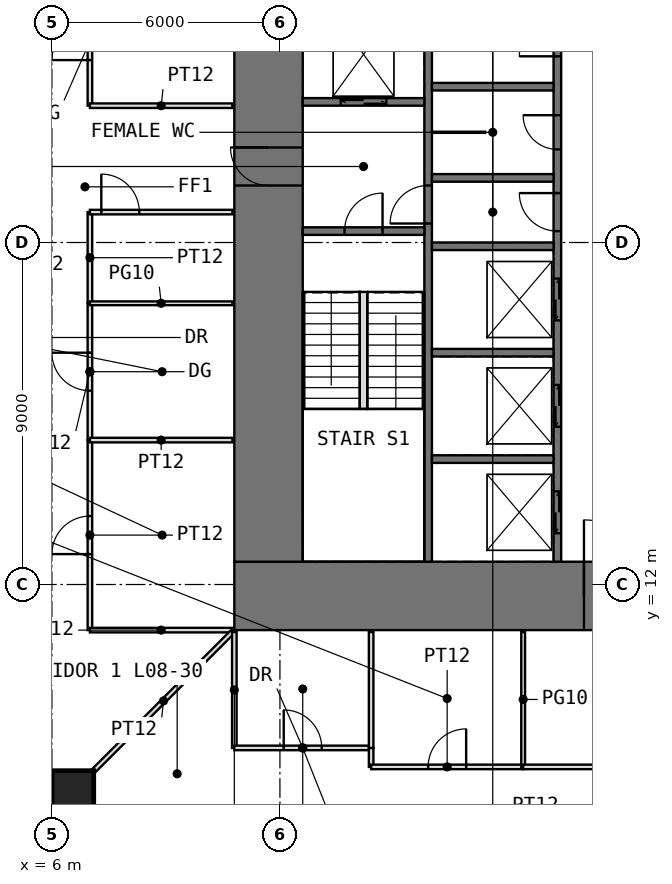
"""IFC4 building model, lengths in metres.
Left out: names, types, materials, properties, quantities, classifications, styles, units other than length and angle.
Written with IfcOpenShell. Run it as: python <this file> out.ifc"""

import sys

from ifc_helpers import new_model, si_unit, direction, frame, frame_2d, origin, origin_2d, place, context, subcontext, project, spatial, rectangle, extrude, element, fill, save


model = new_model("IFC4")
c1 = context("Model", 3, precision=1e-05, world=origin(), true_north=direction((0.0, 1.0)))
c2 = subcontext(c1, "Body", "Model", "MODEL_VIEW")
j1 = project(units=[si_unit("LENGTHUNIT", "METRE"), si_unit("PLANEANGLEUNIT", "RADIAN")], contexts=[c1])
p1 = place(None, origin())
s1 = spatial("IfcSite", under=j1, at=p1, CompositionType="ELEMENT")
p2 = place(p1, origin())
s2 = spatial("IfcBuilding", under=s1, at=p2, CompositionType="ELEMENT")
p3 = place(p2, frame((0.0, 0.0, 38.5)))
s3 = spatial("IfcBuildingStorey", under=s2, at=p3, CompositionType="ELEMENT", Elevation=38.5)
p4 = place(p3, frame((6.55, 6.55, 0.0), z_axis=(0.0, 0.0, 1.0), x_axis=(1.0, 0.0, 0.0)))
e1 = element("IfcColumn", 1, at=p4, inside=s3, PredefinedType="COLUMN", context=c2, shape_type="SweptSolid", body=[
    extrude(rectangle(XDim=1.1, YDim=1.1, at=origin_2d()), origin(), (0.0, 0.0, 1.0), 4.0),
])
p5 = place(p3, frame((10.8, 11.7, -0.05), z_axis=(0.0, 0.0, 1.0), x_axis=(1.0, 0.0, 0.0)))
e2 = element("IfcWall", 2, at=p5, inside=s3, PredefinedType="SHEAR", context=c2, shape_type="SweptSolid", body=[
    extrude(rectangle(XDim=20.4, YDim=1.8, at=frame_2d((10.2, 0.0))), origin(), (0.0, 0.0, 1.0), 4.0),
])
p6 = place(p5, frame((9.2, 0.0, 0.05)))
e3 = element("IfcOpeningElement", 3, at=p6, cuts=e2, PredefinedType="OPENING", context=c2, shape_type="SweptSolid", body=[
    extrude(rectangle(XDim=2.0, YDim=2.2, at=frame_2d((1.0, 1.1))), frame((0.0, 0.91, 0.0), z_axis=(0.0, -1.0, 0.0), x_axis=(1.0, 0.0, 0.0)), (0.0, 0.0, 1.0), 1.82),
])
p7 = place(p3, frame((11.7, 12.6, -0.05), z_axis=(0.0, 0.0, 1.0), x_axis=(0.0, 1.0, 0.0)))
e4 = element("IfcWall", 4, at=p7, inside=s3, PredefinedType="SHEAR", context=c2, shape_type="SweptSolid", body=[
    extrude(rectangle(XDim=16.8, YDim=1.8, at=frame_2d((8.4, 0.0))), origin(), (0.0, 0.0, 1.0), 4.0),
])
p8 = place(p7, frame((9.9, 0.0, 0.05)))
e5 = element("IfcOpeningElement", 5, at=p8, cuts=e4, PredefinedType="OPENING", context=c2, shape_type="SweptSolid", body=[
    extrude(rectangle(XDim=1.0, YDim=2.2, at=frame_2d((0.5, 1.1))), frame((0.0, 0.91, 0.0), z_axis=(0.0, -1.0, 0.0), x_axis=(1.0, 0.0, 0.0)), (0.0, 0.0, 1.0), 1.82),
])
p9 = place(p3, frame((15.9, 12.6, -0.05), z_axis=(0.0, 0.0, 1.0), x_axis=(0.0, 1.0, 0.0)))
e6 = element("IfcWall", 6, at=p9, inside=s3, PredefinedType="SHEAR", context=c2, shape_type="SweptSolid", body=[
    extrude(rectangle(XDim=16.8, YDim=0.2, at=frame_2d((8.4, 0.0))), origin(), (0.0, 0.0, 1.0), 4.0),
])
p10 = place(p9, frame((8.9, 0.0, 0.05)))
e7 = element("IfcOpeningElement", 7, at=p10, cuts=e6, PredefinedType="OPENING", context=c2, shape_type="SweptSolid", body=[
    extrude(rectangle(XDim=1.0, YDim=2.2, at=frame_2d((0.5, 1.1))), frame((0.0, 0.11, 0.0), z_axis=(0.0, -1.0, 0.0), x_axis=(1.0, 0.0, 0.0)), (0.0, 0.0, 1.0), 0.22),
])
p11 = place(p3, frame((19.3, 12.6, -0.05), z_axis=(0.0, 0.0, 1.0), x_axis=(0.0, 1.0, 0.0)))
e8 = element("IfcWall", 8, at=p11, inside=s3, PredefinedType="SHEAR", context=c2, shape_type="SweptSolid", body=[
    extrude(rectangle(XDim=16.8, YDim=0.2, at=frame_2d((8.4, 0.0))), origin(), (0.0, 0.0, 1.0), 4.0),
])
p12 = place(p11, frame((8.7, 0.0, 0.05)))
e9 = element("IfcOpeningElement", 9, at=p12, cuts=e8, PredefinedType="OPENING", context=c2, shape_type="SweptSolid", body=[
    extrude(rectangle(XDim=1.0, YDim=2.2, at=frame_2d((0.5, 1.1))), frame((0.0, 0.11, 0.0), z_axis=(0.0, -1.0, 0.0), x_axis=(1.0, 0.0, 0.0)), (0.0, 0.0, 1.0), 0.22),
])
p13 = place(p11, frame((10.85, 0.0, 0.05)))
e10 = element("IfcOpeningElement", 10, at=p13, cuts=e8, PredefinedType="OPENING", context=c2, shape_type="SweptSolid", body=[
    extrude(rectangle(XDim=0.9, YDim=2.2, at=frame_2d((0.45, 1.1))), frame((0.0, 0.11, 0.0), z_axis=(0.0, -1.0, 0.0), x_axis=(1.0, 0.0, 0.0)), (0.0, 0.0, 1.0), 0.22),
])
p14 = place(p11, frame((13.3, 0.0, 0.05)))
e11 = element("IfcOpeningElement", 11, at=p14, cuts=e8, PredefinedType="OPENING", context=c2, shape_type="SweptSolid", body=[
    extrude(rectangle(XDim=1.0, YDim=2.2, at=frame_2d((0.5, 1.1))), frame((0.0, 0.11, 0.0), z_axis=(0.0, -1.0, 0.0), x_axis=(1.0, 0.0, 0.0)), (0.0, 0.0, 1.0), 0.22),
])
p15 = place(p11, frame((15.55, 0.0, 0.05)))
e12 = element("IfcOpeningElement", 12, at=p15, cuts=e8, PredefinedType="OPENING", context=c2, shape_type="SweptSolid", body=[
    extrude(rectangle(XDim=0.9, YDim=2.2, at=frame_2d((0.45, 1.1))), frame((0.0, 0.11, 0.0), z_axis=(0.0, -1.0, 0.0), x_axis=(1.0, 0.0, 0.0)), (0.0, 0.0, 1.0), 0.22),
])
p16 = place(p11, frame((0.75, 0.0, 0.05)))
e13 = element("IfcOpeningElement", 13, at=p16, cuts=e8, PredefinedType="OPENING", context=c2, shape_type="SweptSolid", body=[
    extrude(rectangle(XDim=1.1, YDim=2.2, at=frame_2d((0.55, 1.1))), frame((0.0, 0.11, 0.0), z_axis=(0.0, -1.0, 0.0), x_axis=(1.0, 0.0, 0.0)), (0.0, 0.0, 1.0), 0.22),
])
p17 = place(p11, frame((3.55, 0.0, 0.05)))
e14 = element("IfcOpeningElement", 14, at=p17, cuts=e8, PredefinedType="OPENING", context=c2, shape_type="SweptSolid", body=[
    extrude(rectangle(XDim=1.1, YDim=2.2, at=frame_2d((0.55, 1.1))), frame((0.0, 0.11, 0.0), z_axis=(0.0, -1.0, 0.0), x_axis=(1.0, 0.0, 0.0)), (0.0, 0.0, 1.0), 0.22),
])
p18 = place(p11, frame((6.35, 0.0, 0.05)))
e15 = element("IfcOpeningElement", 15, at=p18, cuts=e8, PredefinedType="OPENING", context=c2, shape_type="SweptSolid", body=[
    extrude(rectangle(XDim=1.1, YDim=2.2, at=frame_2d((0.55, 1.1))), frame((0.0, 0.11, 0.0), z_axis=(0.0, -1.0, 0.0), x_axis=(1.0, 0.0, 0.0)), (0.0, 0.0, 1.0), 0.22),
])
p19 = place(p3, frame((12.6, 21.3, -0.05), z_axis=(0.0, 0.0, 1.0), x_axis=(1.0, 0.0, 0.0)))
e16 = element("IfcWall", 16, at=p19, inside=s3, PredefinedType="SHEAR", context=c2, shape_type="SweptSolid", body=[
    extrude(rectangle(XDim=3.2, YDim=0.2, at=frame_2d((1.6, 0.0))), origin(), (0.0, 0.0, 1.0), 4.0),
])
p20 = place(p19, frame((1.1, 0.0, 0.05)))
e17 = element("IfcOpeningElement", 17, at=p20, cuts=e16, PredefinedType="OPENING", context=c2, shape_type="SweptSolid", body=[
    extrude(rectangle(XDim=1.0, YDim=2.2, at=frame_2d((0.5, 1.1))), frame((0.0, 0.11, 0.0), z_axis=(0.0, -1.0, 0.0), x_axis=(1.0, 0.0, 0.0)), (0.0, 0.0, 1.0), 0.22),
])
p21 = place(p3, frame((12.6, 24.7, -0.05), z_axis=(0.0, 0.0, 1.0), x_axis=(1.0, 0.0, 0.0)))
e18 = element("IfcWall", 18, at=p21, inside=s3, PredefinedType="SHEAR", context=c2, shape_type="SweptSolid", body=[
    extrude(rectangle(XDim=3.2, YDim=0.2, at=frame_2d((1.6, 0.0))), origin(), (0.0, 0.0, 1.0), 4.0),
])
p22 = place(p21, frame((1.0, 0.0, 0.05)))
e19 = element("IfcOpeningElement", 19, at=p22, cuts=e18, PredefinedType="OPENING", context=c2, shape_type="SweptSolid", body=[
    extrude(rectangle(XDim=1.2, YDim=2.2, at=frame_2d((0.6, 1.1))), frame((0.0, 0.11, 0.0), z_axis=(0.0, -1.0, 0.0), x_axis=(1.0, 0.0, 0.0)), (0.0, 0.0, 1.0), 0.22),
])
for number, where, z_axis, x_axis in (
    (20, (16.0, 15.3, -0.05), (0.0, 0.0, 1.0), (1.0, 0.0, 0.0)),
    (21, (16.0, 18.1, -0.05), (0.0, 0.0, 1.0), (1.0, 0.0, 0.0)),
    (22, (16.0, 20.9, -0.05), (0.0, 0.0, 1.0), (1.0, 0.0, 0.0)),
    (23, (16.0, 22.7, -0.05), (0.0, 0.0, 1.0), (1.0, 0.0, 0.0)),
    (24, (16.0, 25.1, -0.05), (0.0, 0.0, 1.0), (1.0, 0.0, 0.0)),
):
    element("IfcWall", number, at=place(p3, frame(where, z_axis=z_axis, x_axis=x_axis)), inside=s3, PredefinedType="SHEAR", context=c2, shape_type="SweptSolid", body=[
        extrude(rectangle(XDim=3.2, YDim=0.2, at=frame_2d((1.6, 0.0))), origin(), (0.0, 0.0, 1.0), 4.0),
    ])
p23 = place(p3, frame((16.0, 23.9, 0.0), z_axis=(0.0, 0.0, 1.0), x_axis=(1.0, 0.0, 0.0)))
e25 = element("IfcWall", 25, at=p23, inside=s3, PredefinedType="PARTITIONING", context=c2, shape_type="SweptSolid", body=[
    extrude(rectangle(XDim=1.4, YDim=0.03, at=frame_2d((0.7, 0.0))), origin(), (0.0, 0.0, 1.0), 3.75),
])
p24 = place(p3, frame((7.0, 10.8, 0.0), z_axis=(0.0, 0.0, 1.0), x_axis=(0.0, 1.0, 0.0)))
e26 = element("IfcWall", 26, at=p24, inside=s3, PredefinedType="PARTITIONING", context=c2, shape_type="SweptSolid", body=[
    extrude(rectangle(XDim=5.0, YDim=0.12, at=frame_2d((2.5, 0.0))), origin(), (0.0, 0.0, 1.0), 3.75),
])
p25 = place(p24, frame((2.0, 0.0, 0.0)))
e27 = element("IfcOpeningElement", 27, at=p25, cuts=e26, PredefinedType="OPENING", context=c2, shape_type="SweptSolid", body=[
    extrude(rectangle(XDim=1.0, YDim=2.2, at=frame_2d((0.5, 1.1))), frame((0.0, 0.07, 0.0), z_axis=(0.0, -1.0, 0.0), x_axis=(1.0, 0.0, 0.0)), (0.0, 0.0, 1.0), 0.14),
])
p26 = place(p3, frame((7.0, 10.8, 0.0), z_axis=(0.0, 0.0, 1.0), x_axis=(1.0, 0.0, 0.0)))
e28 = element("IfcWall", 28, at=p26, inside=s3, PredefinedType="PARTITIONING", context=c2, shape_type="SweptSolid", body=[
    extrude(rectangle(XDim=3.75, YDim=0.12, at=frame_2d((1.875, 0.0))), origin(), (0.0, 0.0, 1.0), 3.75),
])
p27 = place(p3, frame((7.0, 15.8, 0.0), z_axis=(0.0, 0.0, 1.0), x_axis=(0.0, 1.0, 0.0)))
e29 = element("IfcWall", 29, at=p27, inside=s3, PredefinedType="PARTITIONING", context=c2, shape_type="SweptSolid", body=[
    extrude(rectangle(XDim=3.6, YDim=0.12, at=frame_2d((1.8, 0.0))), origin(), (0.0, 0.0, 1.0), 3.75),
])
p28 = place(p27, frame((1.3, 0.0, 0.0)))
e30 = element("IfcOpeningElement", 30, at=p28, cuts=e29, PredefinedType="OPENING", context=c2, shape_type="SweptSolid", body=[
    extrude(rectangle(XDim=1.0, YDim=2.4, at=frame_2d((0.5, 1.2))), frame((0.0, 0.07, 0.0), z_axis=(0.0, -1.0, 0.0), x_axis=(1.0, 0.0, 0.0)), (0.0, 0.0, 1.0), 0.14),
])
p29 = place(p3, frame((7.0, 15.8, 0.0), z_axis=(0.0, 0.0, 1.0), x_axis=(1.0, 0.0, 0.0)))
e31 = element("IfcWall", 31, at=p29, inside=s3, PredefinedType="PARTITIONING", context=c2, shape_type="SweptSolid", body=[
    extrude(rectangle(XDim=3.75, YDim=0.12, at=frame_2d((1.875, 0.0))), origin(), (0.0, 0.0, 1.0), 3.75),
])
p30 = place(p3, frame((7.0, 19.4, 0.0), z_axis=(0.0, 0.0, 1.0), x_axis=(0.0, 1.0, 0.0)))
e32 = element("IfcWall", 32, at=p30, inside=s3, PredefinedType="PARTITIONING", context=c2, shape_type="SweptSolid", body=[
    extrude(rectangle(XDim=2.4, YDim=0.12, at=frame_2d((1.2, 0.0))), origin(), (0.0, 0.0, 1.0), 3.75),
])
p31 = place(p3, frame((7.0, 19.4, 0.0), z_axis=(0.0, 0.0, 1.0), x_axis=(1.0, 0.0, 0.0)))
e33 = element("IfcWall", 33, at=p31, inside=s3, PredefinedType="PARTITIONING", context=c2, shape_type="SweptSolid", body=[
    extrude(rectangle(XDim=3.75, YDim=0.1, at=frame_2d((1.875, 0.0))), origin(), (0.0, 0.0, 1.0), 3.75),
])
p32 = place(p3, frame((7.0, 21.8, 0.0), z_axis=(0.0, 0.0, 1.0), x_axis=(1.0, 0.0, 0.0)))
e34 = element("IfcWall", 34, at=p32, inside=s3, PredefinedType="PARTITIONING", context=c2, shape_type="SweptSolid", body=[
    extrude(rectangle(XDim=3.75, YDim=0.12, at=frame_2d((1.875, 0.0))), origin(), (0.0, 0.0, 1.0), 3.75),
])
p33 = place(p32, frame((0.3, 0.0, 0.0)))
e35 = element("IfcOpeningElement", 35, at=p33, cuts=e34, PredefinedType="OPENING", context=c2, shape_type="SweptSolid", body=[
    extrude(rectangle(XDim=1.0, YDim=2.4, at=frame_2d((0.5, 1.2))), frame((0.0, 0.07, 0.0), z_axis=(0.0, -1.0, 0.0), x_axis=(1.0, 0.0, 0.0)), (0.0, 0.0, 1.0), 0.14),
])
p34 = place(p3, frame((7.0, 24.6, 0.0), z_axis=(0.0, 0.0, 1.0), x_axis=(0.0, 1.0, 0.0)))
e36 = element("IfcWall", 36, at=p34, inside=s3, PredefinedType="PARTITIONING", context=c2, shape_type="SweptSolid", body=[
    extrude(rectangle(XDim=3.4, YDim=0.12, at=frame_2d((1.7, 0.0))), origin(), (0.0, 0.0, 1.0), 3.75),
])
p35 = place(p34, frame((1.2, 0.0, 0.0)))
e37 = element("IfcOpeningElement", 37, at=p35, cuts=e36, PredefinedType="OPENING", context=c2, shape_type="SweptSolid", body=[
    extrude(rectangle(XDim=1.0, YDim=2.4, at=frame_2d((0.5, 1.2))), frame((0.0, 0.07, 0.0), z_axis=(0.0, -1.0, 0.0), x_axis=(1.0, 0.0, 0.0)), (0.0, 0.0, 1.0), 0.14),
])
p36 = place(p3, frame((7.0, 24.6, 0.0), z_axis=(0.0, 0.0, 1.0), x_axis=(1.0, 0.0, 0.0)))
e38 = element("IfcWall", 38, at=p36, inside=s3, PredefinedType="PARTITIONING", context=c2, shape_type="SweptSolid", body=[
    extrude(rectangle(XDim=3.75, YDim=0.12, at=frame_2d((1.875, 0.0))), origin(), (0.0, 0.0, 1.0), 3.75),
])
p37 = place(p3, frame((7.11, 7.11, 0.0), z_axis=(0.0, 0.0, 1.0), x_axis=(0.707106781187, 0.707106781187, 0.0)))
e39 = element("IfcWall", 39, at=p37, inside=s3, PredefinedType="PARTITIONING", context=c2, shape_type="SweptSolid", body=[
    extrude(rectangle(XDim=5.168, YDim=0.12, at=frame_2d((2.584, 0.0))), origin(), (0.0, 0.0, 1.0), 3.75),
])
p38 = place(p3, frame((10.8, 7.7, 0.0), z_axis=(0.0, 0.0, 1.0), x_axis=(0.0, 1.0, 0.0)))
e40 = element("IfcWall", 40, at=p38, inside=s3, PredefinedType="PARTITIONING", context=c2, shape_type="SweptSolid", body=[
    extrude(rectangle(XDim=3.05, YDim=0.12, at=frame_2d((1.525, 0.0))), origin(), (0.0, 0.0, 1.0), 3.75),
])
p39 = place(p3, frame((10.8, 7.7, 0.0), z_axis=(0.0, 0.0, 1.0), x_axis=(1.0, 0.0, 0.0)))
e41 = element("IfcWall", 41, at=p39, inside=s3, PredefinedType="PARTITIONING", context=c2, shape_type="SweptSolid", body=[
    extrude(rectangle(XDim=3.6, YDim=0.12, at=frame_2d((1.8, 0.0))), origin(), (0.0, 0.0, 1.0), 3.75),
])
p40 = place(p39, frame((1.3, 0.0, 0.0)))
e42 = element("IfcOpeningElement", 42, at=p40, cuts=e41, PredefinedType="OPENING", context=c2, shape_type="SweptSolid", body=[
    extrude(rectangle(XDim=1.0, YDim=2.2, at=frame_2d((0.5, 1.1))), frame((0.0, 0.07, 0.0), z_axis=(0.0, -1.0, 0.0), x_axis=(1.0, 0.0, 0.0)), (0.0, 0.0, 1.0), 0.14),
])
p41 = place(p3, frame((14.4, 7.2, 0.0), z_axis=(0.0, 0.0, 1.0), x_axis=(0.0, 1.0, 0.0)))
e43 = element("IfcWall", 43, at=p41, inside=s3, PredefinedType="PARTITIONING", context=c2, shape_type="SweptSolid", body=[
    extrude(rectangle(XDim=0.5, YDim=0.12, at=frame_2d((0.25, 0.0))), origin(), (0.0, 0.0, 1.0), 3.75),
])
p42 = place(p3, frame((14.4, 7.2, 0.0), z_axis=(0.0, 0.0, 1.0), x_axis=(1.0, 0.0, 0.0)))
e44 = element("IfcWall", 44, at=p42, inside=s3, PredefinedType="PARTITIONING", context=c2, shape_type="SweptSolid", body=[
    extrude(rectangle(XDim=4.0, YDim=0.12, at=frame_2d((2.0, 0.0))), origin(), (0.0, 0.0, 1.0), 3.75),
])
p43 = place(p42, frame((1.5, 0.0, 0.0)))
e45 = element("IfcOpeningElement", 45, at=p43, cuts=e44, PredefinedType="OPENING", context=c2, shape_type="SweptSolid", body=[
    extrude(rectangle(XDim=1.0, YDim=2.4, at=frame_2d((0.5, 1.2))), frame((0.0, 0.07, 0.0), z_axis=(0.0, -1.0, 0.0), x_axis=(1.0, 0.0, 0.0)), (0.0, 0.0, 1.0), 0.14),
])
p44 = place(p3, frame((14.4, 7.7, 0.0), z_axis=(0.0, 0.0, 1.0), x_axis=(0.0, 1.0, 0.0)))
e46 = element("IfcWall", 46, at=p44, inside=s3, PredefinedType="PARTITIONING", context=c2, shape_type="SweptSolid", body=[
    extrude(rectangle(XDim=3.05, YDim=0.12, at=frame_2d((1.525, 0.0))), origin(), (0.0, 0.0, 1.0), 3.75),
])
p45 = place(p3, frame((18.4, 7.2, 0.0), z_axis=(0.0, 0.0, 1.0), x_axis=(0.0, 1.0, 0.0)))
e47 = element("IfcWall", 47, at=p45, inside=s3, PredefinedType="PARTITIONING", context=c2, shape_type="SweptSolid", body=[
    extrude(rectangle(XDim=3.55, YDim=0.1, at=frame_2d((1.775, 0.0))), origin(), (0.0, 0.0, 1.0), 3.75),
])
p46 = place(p3, frame((18.4, 7.2, 0.0), z_axis=(0.0, 0.0, 1.0), x_axis=(1.0, 0.0, 0.0)))
e48 = element("IfcWall", 48, at=p46, inside=s3, PredefinedType="PARTITIONING", context=c2, shape_type="SweptSolid", body=[
    extrude(rectangle(XDim=5.2, YDim=0.12, at=frame_2d((2.6, 0.0))), origin(), (0.0, 0.0, 1.0), 3.75),
])
p47 = place(p46, frame((2.1, 0.0, 0.0)))
e49 = element("IfcOpeningElement", 49, at=p47, cuts=e48, PredefinedType="OPENING", context=c2, shape_type="SweptSolid", body=[
    extrude(rectangle(XDim=1.0, YDim=2.4, at=frame_2d((0.5, 1.2))), frame((0.0, 0.07, 0.0), z_axis=(0.0, -1.0, 0.0), x_axis=(1.0, 0.0, 0.0)), (0.0, 0.0, 1.0), 0.14),
])
p48 = place(p3, frame((14.2, 16.62, 0.0), z_axis=(0.0, 0.0, 1.0), x_axis=(0.0, 1.0, 0.0)))
e50 = element("IfcWall", 50, at=p48, inside=s3, PredefinedType="PARTITIONING", context=c2, shape_type="SweptSolid", body=[
    extrude(rectangle(XDim=3.08, YDim=0.2, at=frame_2d((1.54, 0.0))), origin(), (0.0, 0.0, 1.0), 4.0),
])
p49 = place(p6, origin())
e51 = element("IfcDoor", 51, at=p49, inside=s3, OperationType="DOUBLE_DOOR_SINGLE_SWING", PredefinedType="DOOR", context=c2, shape_type="SweptSolid", body=[
    extrude(rectangle(XDim=2.0, YDim=2.2, at=frame_2d((1.0, 1.1))), frame((0.0, 0.025, 0.0), z_axis=(0.0, -1.0, 0.0), x_axis=(1.0, 0.0, 0.0)), (0.0, 0.0, 1.0), 0.05),
])
fill(e3, e51)
p50 = place(p8, origin())
e52 = element("IfcDoor", 52, at=p50, inside=s3, OperationType="SINGLE_SWING_RIGHT", PredefinedType="DOOR", context=c2, shape_type="SweptSolid", body=[
    extrude(rectangle(XDim=1.0, YDim=2.2, at=frame_2d((0.5, 1.1))), frame((0.0, 0.025, 0.0), z_axis=(0.0, -1.0, 0.0), x_axis=(1.0, 0.0, 0.0)), (0.0, 0.0, 1.0), 0.05),
])
fill(e5, e52)
p51 = place(p20, origin())
e53 = element("IfcDoor", 53, at=p51, inside=s3, OperationType="SINGLE_SWING_RIGHT", PredefinedType="DOOR", context=c2, shape_type="SweptSolid", body=[
    extrude(rectangle(XDim=1.0, YDim=2.2, at=frame_2d((0.5, 1.1))), frame((0.0, 0.025, 0.0), z_axis=(0.0, -1.0, 0.0), x_axis=(1.0, 0.0, 0.0)), (0.0, 0.0, 1.0), 0.05),
])
fill(e17, e53)
p52 = place(p10, origin())
e54 = element("IfcDoor", 54, at=p52, inside=s3, OperationType="SINGLE_SWING_LEFT", PredefinedType="DOOR", context=c2, shape_type="SweptSolid", body=[
    extrude(rectangle(XDim=1.0, YDim=2.2, at=frame_2d((0.5, 1.1))), frame((0.0, 0.025, 0.0), z_axis=(0.0, -1.0, 0.0), x_axis=(1.0, 0.0, 0.0)), (0.0, 0.0, 1.0), 0.05),
])
fill(e7, e54)
p53 = place(p12, origin())
e55 = element("IfcDoor", 55, at=p53, inside=s3, OperationType="SINGLE_SWING_RIGHT", PredefinedType="DOOR", context=c2, shape_type="SweptSolid", body=[
    extrude(rectangle(XDim=1.0, YDim=2.2, at=frame_2d((0.5, 1.1))), frame((0.0, 0.025, 0.0), z_axis=(0.0, -1.0, 0.0), x_axis=(1.0, 0.0, 0.0)), (0.0, 0.0, 1.0), 0.05),
])
fill(e9, e55)
p54 = place(p13, origin())
e56 = element("IfcDoor", 56, at=p54, inside=s3, OperationType="SINGLE_SWING_RIGHT", PredefinedType="DOOR", context=c2, shape_type="SweptSolid", body=[
    extrude(rectangle(XDim=0.9, YDim=2.2, at=frame_2d((0.45, 1.1))), frame((0.0, 0.025, 0.0), z_axis=(0.0, -1.0, 0.0), x_axis=(1.0, 0.0, 0.0)), (0.0, 0.0, 1.0), 0.05),
])
fill(e10, e56)
p55 = place(p14, origin())
e57 = element("IfcDoor", 57, at=p55, inside=s3, OperationType="SINGLE_SWING_LEFT", PredefinedType="DOOR", context=c2, shape_type="SweptSolid", body=[
    extrude(rectangle(XDim=1.0, YDim=2.2, at=frame_2d((0.5, 1.1))), frame((0.0, 0.025, 0.0), z_axis=(0.0, -1.0, 0.0), x_axis=(1.0, 0.0, 0.0)), (0.0, 0.0, 1.0), 0.05),
])
fill(e11, e57)
p56 = place(p40, origin())
e58 = element("IfcDoor", 58, at=p56, inside=s3, OperationType="SINGLE_SWING_LEFT", PredefinedType="DOOR", context=c2, shape_type="SweptSolid", body=[
    extrude(rectangle(XDim=1.0, YDim=2.2, at=frame_2d((0.5, 1.1))), frame((0.0, 0.025, 0.0), z_axis=(0.0, -1.0, 0.0), x_axis=(1.0, 0.0, 0.0)), (0.0, 0.0, 1.0), 0.05),
])
fill(e42, e58)
p57 = place(p43, origin())
e59 = element("IfcDoor", 59, at=p57, inside=s3, OperationType="SINGLE_SWING_RIGHT", PredefinedType="DOOR", context=c2, shape_type="SweptSolid", body=[
    extrude(rectangle(XDim=1.0, YDim=2.4, at=frame_2d((0.5, 1.2))), frame((0.0, 0.025, 0.0), z_axis=(0.0, -1.0, 0.0), x_axis=(1.0, 0.0, 0.0)), (0.0, 0.0, 1.0), 0.05),
])
fill(e45, e59)
p58 = place(p25, origin())
e60 = element("IfcDoor", 60, at=p58, inside=s3, OperationType="SINGLE_SWING_LEFT", PredefinedType="DOOR", context=c2, shape_type="SweptSolid", body=[
    extrude(rectangle(XDim=1.0, YDim=2.2, at=frame_2d((0.5, 1.1))), frame((0.0, 0.025, 0.0), z_axis=(0.0, -1.0, 0.0), x_axis=(1.0, 0.0, 0.0)), (0.0, 0.0, 1.0), 0.05),
])
fill(e27, e60)
p59 = place(p28, origin())
e61 = element("IfcDoor", 61, at=p59, inside=s3, OperationType="SINGLE_SWING_RIGHT", PredefinedType="DOOR", context=c2, shape_type="SweptSolid", body=[
    extrude(rectangle(XDim=1.0, YDim=2.4, at=frame_2d((0.5, 1.2))), frame((0.0, 0.025, 0.0), z_axis=(0.0, -1.0, 0.0), x_axis=(1.0, 0.0, 0.0)), (0.0, 0.0, 1.0), 0.05),
])
fill(e30, e61)
p60 = place(p35, origin())
e62 = element("IfcDoor", 62, at=p60, inside=s3, OperationType="SINGLE_SWING_LEFT", PredefinedType="DOOR", context=c2, shape_type="SweptSolid", body=[
    extrude(rectangle(XDim=1.0, YDim=2.4, at=frame_2d((0.5, 1.2))), frame((0.0, 0.025, 0.0), z_axis=(0.0, -1.0, 0.0), x_axis=(1.0, 0.0, 0.0)), (0.0, 0.0, 1.0), 0.05),
])
fill(e37, e62)
p61 = place(p33, origin())
e63 = element("IfcDoor", 63, at=p61, inside=s3, OperationType="SINGLE_SWING_LEFT", PredefinedType="DOOR", context=c2, shape_type="SweptSolid", body=[
    extrude(rectangle(XDim=1.0, YDim=2.4, at=frame_2d((0.5, 1.2))), frame((0.0, 0.025, 0.0), z_axis=(0.0, -1.0, 0.0), x_axis=(1.0, 0.0, 0.0)), (0.0, 0.0, 1.0), 0.05),
])
fill(e35, e63)
p62 = place(p16, origin())
e64 = element("IfcDoor", 64, at=p62, inside=s3, OperationType="DOUBLE_DOOR_SLIDING", PredefinedType="DOOR", context=c2, shape_type="SweptSolid", body=[
    extrude(rectangle(XDim=1.1, YDim=2.2, at=frame_2d((0.55, 1.1))), frame((0.0, 0.025, 0.0), z_axis=(0.0, -1.0, 0.0), x_axis=(1.0, 0.0, 0.0)), (0.0, 0.0, 1.0), 0.05),
])
fill(e13, e64)
p63 = place(p17, origin())
e65 = element("IfcDoor", 65, at=p63, inside=s3, OperationType="DOUBLE_DOOR_SLIDING", PredefinedType="DOOR", context=c2, shape_type="SweptSolid", body=[
    extrude(rectangle(XDim=1.1, YDim=2.2, at=frame_2d((0.55, 1.1))), frame((0.0, 0.025, 0.0), z_axis=(0.0, -1.0, 0.0), x_axis=(1.0, 0.0, 0.0)), (0.0, 0.0, 1.0), 0.05),
])
fill(e14, e65)
p64 = place(p18, origin())
e66 = element("IfcDoor", 66, at=p64, inside=s3, OperationType="DOUBLE_DOOR_SLIDING", PredefinedType="DOOR", context=c2, shape_type="SweptSolid", body=[
    extrude(rectangle(XDim=1.1, YDim=2.2, at=frame_2d((0.55, 1.1))), frame((0.0, 0.025, 0.0), z_axis=(0.0, -1.0, 0.0), x_axis=(1.0, 0.0, 0.0)), (0.0, 0.0, 1.0), 0.05),
])
fill(e15, e66)
p65 = place(p22, origin())
e67 = element("IfcDoor", 67, at=p65, inside=s3, OperationType="DOUBLE_DOOR_SLIDING", PredefinedType="DOOR", context=c2, shape_type="SweptSolid", body=[
    extrude(rectangle(XDim=1.2, YDim=2.2, at=frame_2d((0.6, 1.1))), frame((0.0, 0.025, 0.0), z_axis=(0.0, -1.0, 0.0), x_axis=(1.0, 0.0, 0.0)), (0.0, 0.0, 1.0), 0.05),
])
fill(e19, e67)
save(model, sys.argv[1])
